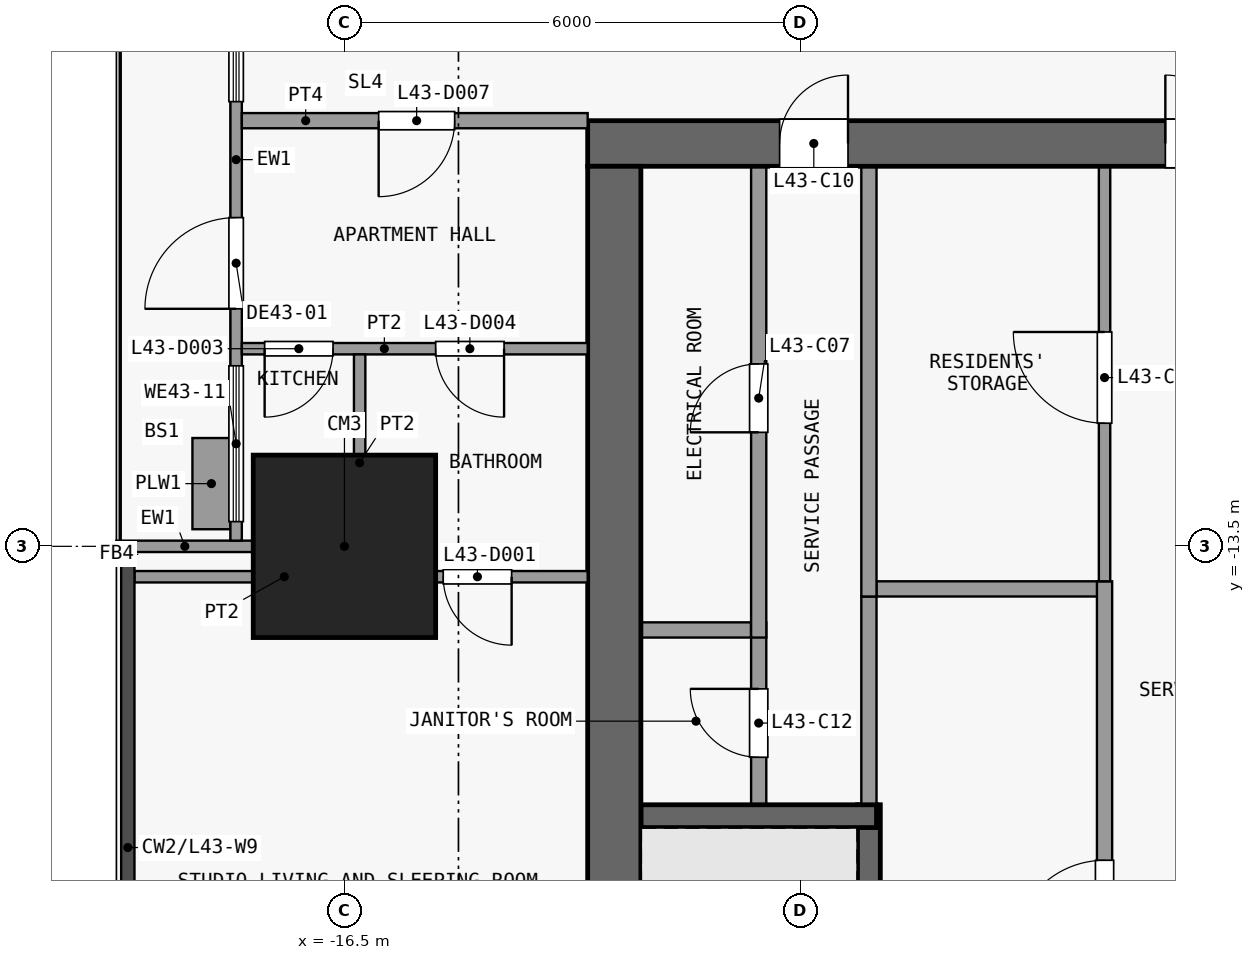
"""IFC4 building model, lengths in metres.
Left out: names, types, materials, properties, quantities, classifications, styles, units other than length and angle.
Written with IfcOpenShell. Run it as: python <this file> out.ifc"""

import sys

from ifc_helpers import new_model, si_unit, direction, frame, frame_2d, origin, origin_2d, place, context, subcontext, project, spatial, rectangle, extrude, element, fill, save


model = new_model("IFC4")
c1 = context("Model", 3, precision=1e-05, world=origin(), true_north=direction((0.0, 1.0)))
c2 = subcontext(c1, "Body", "Model", "MODEL_VIEW")
j1 = project(units=[si_unit("LENGTHUNIT", "METRE"), si_unit("PLANEANGLEUNIT", "RADIAN")], contexts=[c1])
p1 = place(None, origin())
s1 = spatial("IfcSite", under=j1, at=p1, CompositionType="ELEMENT")
p2 = place(p1, origin())
s2 = spatial("IfcBuilding", under=s1, at=p2, CompositionType="ELEMENT")
p3 = place(p2, frame((0.0, 0.0, 174.5)))
s3 = spatial("IfcBuildingStorey", under=s2, at=p3, CompositionType="ELEMENT", Elevation=174.5)
p4 = place(p3, frame((-16.5, -13.5, 0.0), z_axis=(0.0, 0.0, 1.0), x_axis=(1.0, 0.0, 0.0)))
e1 = element("IfcColumn", 1, at=p4, inside=s3, PredefinedType="COLUMN", context=c2, shape_type="SweptSolid", body=[
    extrude(rectangle(XDim=2.4, YDim=2.4, at=origin_2d()), origin(), (0.0, 0.0, 1.0), 3.6),
])
p5 = place(p3, frame((-13.3, -8.2, 0.0), z_axis=(0.0, 0.0, 1.0), x_axis=(1.0, 0.0, 0.0)))
e2 = element("IfcWall", 2, at=p5, inside=s3, PredefinedType="SHEAR", context=c2, shape_type="SweptSolid", body=[
    extrude(rectangle(XDim=26.6, YDim=0.6, at=frame_2d((13.3, 0.0))), origin(), (0.0, 0.0, 1.0), 3.3),
])
p6 = place(p5, frame((7.6, 0.0, 0.0)))
e3 = element("IfcOpeningElement", 3, at=p6, cuts=e2, PredefinedType="OPENING", context=c2, shape_type="SweptSolid", body=[
    extrude(rectangle(XDim=1.8, YDim=2.1, at=frame_2d((0.9, 1.05))), frame((0.0, 0.31, 0.0), z_axis=(0.0, -1.0, 0.0), x_axis=(1.0, 0.0, 0.0)), (0.0, 0.0, 1.0), 0.62),
])
p7 = place(p5, frame((17.2, 0.0, 0.0)))
e4 = element("IfcOpeningElement", 4, at=p7, cuts=e2, PredefinedType="OPENING", context=c2, shape_type="SweptSolid", body=[
    extrude(rectangle(XDim=1.8, YDim=2.1, at=frame_2d((0.9, 1.05))), frame((0.0, 0.31, 0.0), z_axis=(0.0, -1.0, 0.0), x_axis=(1.0, 0.0, 0.0)), (0.0, 0.0, 1.0), 0.62),
])
p8 = place(p5, frame((2.525, 0.0, 0.0)))
e5 = element("IfcOpeningElement", 5, at=p8, cuts=e2, PredefinedType="OPENING", context=c2, shape_type="SweptSolid", body=[
    extrude(rectangle(XDim=0.9, YDim=2.1, at=frame_2d((0.45, 1.05))), frame((0.0, 0.31, 0.0), z_axis=(0.0, -1.0, 0.0), x_axis=(1.0, 0.0, 0.0)), (0.0, 0.0, 1.0), 0.62),
])
p9 = place(p5, frame((23.175, 0.0, 0.0)))
e6 = element("IfcOpeningElement", 6, at=p9, cuts=e2, PredefinedType="OPENING", context=c2, shape_type="SweptSolid", body=[
    extrude(rectangle(XDim=0.9, YDim=2.1, at=frame_2d((0.45, 1.05))), frame((0.0, 0.31, 0.0), z_axis=(0.0, -1.0, 0.0), x_axis=(1.0, 0.0, 0.0)), (0.0, 0.0, 1.0), 0.62),
])
p10 = place(p3, frame((-12.95, -24.6, 0.0), z_axis=(0.0, 0.0, 1.0), x_axis=(0.0, 1.0, 0.0)))
e7 = element("IfcWall", 7, at=p10, inside=s3, PredefinedType="SHEAR", context=c2, shape_type="SweptSolid", body=[
    extrude(rectangle(XDim=16.1, YDim=0.7, at=frame_2d((8.05, 0.0))), origin(), (0.0, 0.0, 1.0), 3.3),
])
p11 = place(p3, frame((-12.6, -17.05, 0.0), z_axis=(0.0, 0.0, 1.0), x_axis=(1.0, 0.0, 0.0)))
e8 = element("IfcWall", 8, at=p11, inside=s3, PredefinedType="SHEAR", context=c2, shape_type="SweptSolid", body=[
    extrude(rectangle(XDim=3.1, YDim=0.3, at=frame_2d((1.55, 0.0))), origin(), (0.0, 0.0, 1.0), 3.3),
])
p12 = place(p3, frame((-12.6, -14.6, 0.0), z_axis=(0.0, 0.0, 1.0), x_axis=(1.0, 0.0, 0.0)))
e9 = element("IfcWall", 9, at=p12, inside=s3, PredefinedType="PARTITIONING", context=c2, shape_type="SweptSolid", body=[
    extrude(rectangle(XDim=1.45, YDim=0.2, at=frame_2d((0.725, 0.0))), origin(), (0.0, 0.0, 1.0), 3.3),
])
p13 = place(p3, frame((-9.5, -14.06, 0.0), z_axis=(0.0, 0.0, 1.0), x_axis=(1.0, 0.0, 0.0)))
e10 = element("IfcWall", 10, at=p13, inside=s3, PredefinedType="PARTITIONING", context=c2, shape_type="SweptSolid", body=[
    extrude(rectangle(XDim=3.075, YDim=0.2, at=frame_2d((1.538, 0.0))), origin(), (0.0, 0.0, 1.0), 3.3),
])
p14 = place(p3, frame((-11.05, -16.9, 0.0), z_axis=(0.0, 0.0, 1.0), x_axis=(0.0, 1.0, 0.0)))
e11 = element("IfcWall", 11, at=p14, inside=s3, PredefinedType="PARTITIONING", context=c2, shape_type="SweptSolid", body=[
    extrude(rectangle(XDim=2.4, YDim=0.2, at=frame_2d((1.2, 0.0))), origin(), (0.0, 0.0, 1.0), 3.3),
])
p15 = place(p14, frame((0.625, 0.0, 0.0)))
e12 = element("IfcOpeningElement", 12, at=p15, cuts=e11, PredefinedType="OPENING", context=c2, shape_type="SweptSolid", body=[
    extrude(rectangle(XDim=0.9, YDim=2.1, at=frame_2d((0.45, 1.05))), frame((0.0, 0.11, 0.0), z_axis=(0.0, -1.0, 0.0), x_axis=(1.0, 0.0, 0.0)), (0.0, 0.0, 1.0), 0.22),
])
p16 = place(p3, frame((-11.05, -14.7, 0.0), z_axis=(0.0, 0.0, 1.0), x_axis=(0.0, 1.0, 0.0)))
e13 = element("IfcWall", 13, at=p16, inside=s3, PredefinedType="PARTITIONING", context=c2, shape_type="SweptSolid", body=[
    extrude(rectangle(XDim=6.2, YDim=0.2, at=frame_2d((3.1, 0.0))), origin(), (0.0, 0.0, 1.0), 3.3),
])
p17 = place(p16, frame((2.7, 0.0, 0.0)))
e14 = element("IfcOpeningElement", 14, at=p17, cuts=e13, PredefinedType="OPENING", context=c2, shape_type="SweptSolid", body=[
    extrude(rectangle(XDim=0.9, YDim=2.1, at=frame_2d((0.45, 1.05))), frame((0.0, 0.11, 0.0), z_axis=(0.0, -1.0, 0.0), x_axis=(1.0, 0.0, 0.0)), (0.0, 0.0, 1.0), 0.22),
])
p18 = place(p3, frame((-9.6, -24.6, 0.0), z_axis=(0.0, 0.0, 1.0), x_axis=(0.0, 1.0, 0.0)))
e15 = element("IfcWall", 15, at=p18, inside=s3, PredefinedType="SHEAR", context=c2, shape_type="SweptSolid", body=[
    extrude(rectangle(XDim=7.7, YDim=0.3, at=frame_2d((3.85, 0.0))), origin(), (0.0, 0.0, 1.0), 3.3),
])
p19 = place(p18, frame((0.1, 0.0, 0.0)))
e16 = element("IfcOpeningElement", 16, at=p19, cuts=e15, PredefinedType="OPENING", context=c2, shape_type="SweptSolid", body=[
    extrude(rectangle(XDim=1.1, YDim=2.1, at=frame_2d((0.55, 1.05))), frame((0.0, 0.16, 0.0), z_axis=(0.0, -1.0, 0.0), x_axis=(1.0, 0.0, 0.0)), (0.0, 0.0, 1.0), 0.32),
])
p20 = place(p3, frame((-9.6, -16.9, 0.0), z_axis=(0.0, 0.0, 1.0), x_axis=(0.0, 1.0, 0.0)))
e17 = element("IfcWall", 17, at=p20, inside=s3, PredefinedType="PARTITIONING", context=c2, shape_type="SweptSolid", body=[
    extrude(rectangle(XDim=2.74, YDim=0.2, at=frame_2d((1.37, 0.0))), origin(), (0.0, 0.0, 1.0), 3.3),
])
p21 = place(p3, frame((-9.6, -14.16, 0.0), z_axis=(0.0, 0.0, 1.0), x_axis=(0.0, 1.0, 0.0)))
e18 = element("IfcWall", 18, at=p21, inside=s3, PredefinedType="PARTITIONING", context=c2, shape_type="SweptSolid", body=[
    extrude(rectangle(XDim=5.66, YDim=0.2, at=frame_2d((2.83, 0.0))), origin(), (0.0, 0.0, 1.0), 3.3),
])
p22 = place(p3, frame((-6.5, -22.5, 0.0), z_axis=(0.0, 0.0, 1.0), x_axis=(0.0, 1.0, 0.0)))
e19 = element("IfcWall", 19, at=p22, inside=s3, PredefinedType="PARTITIONING", context=c2, shape_type="SweptSolid", body=[
    extrude(rectangle(XDim=8.54, YDim=0.2, at=frame_2d((4.27, 0.0))), origin(), (0.0, 0.0, 1.0), 3.3),
])
p23 = place(p22, frame((3.67, 0.0, 0.0)))
e20 = element("IfcOpeningElement", 20, at=p23, cuts=e19, PredefinedType="OPENING", context=c2, shape_type="SweptSolid", body=[
    extrude(rectangle(XDim=1.2, YDim=2.1, at=frame_2d((0.6, 1.05))), frame((0.0, 0.11, 0.0), z_axis=(0.0, -1.0, 0.0), x_axis=(1.0, 0.0, 0.0)), (0.0, 0.0, 1.0), 0.22),
])
p24 = place(p3, frame((-6.5, -13.96, 0.0), z_axis=(0.0, 0.0, 1.0), x_axis=(0.0, 1.0, 0.0)))
e21 = element("IfcWall", 21, at=p24, inside=s3, PredefinedType="PARTITIONING", context=c2, shape_type="SweptSolid", body=[
    extrude(rectangle(XDim=5.46, YDim=0.15, at=frame_2d((2.73, 0.0))), origin(), (0.0, 0.0, 1.0), 3.3),
])
p25 = place(p24, frame((2.08, 0.0, 0.0)))
e22 = element("IfcOpeningElement", 22, at=p25, cuts=e21, PredefinedType="OPENING", context=c2, shape_type="SweptSolid", body=[
    extrude(rectangle(XDim=1.2, YDim=2.1, at=frame_2d((0.6, 1.05))), frame((0.0, 0.085, 0.0), z_axis=(0.0, -1.0, 0.0), x_axis=(1.0, 0.0, 0.0)), (0.0, 0.0, 1.0), 0.17),
])
p26 = place(p3, frame((-17.7, -13.5, 0.0), z_axis=(0.0, 0.0, 1.0), x_axis=(-1.0, 0.0, 0.0)))
e23 = element("IfcWall", 23, at=p26, inside=s3, PredefinedType="SOLIDWALL", context=c2, shape_type="SweptSolid", body=[
    extrude(rectangle(XDim=1.8, YDim=0.15, at=frame_2d((0.9, 0.0))), origin(), (0.0, 0.0, 1.0), 3.3),
])
p27 = place(p3, frame((-17.925, -13.425, 0.0), z_axis=(0.0, 0.0, 1.0), x_axis=(0.0, 1.0, 0.0)))
e24 = element("IfcWall", 24, at=p27, inside=s3, PredefinedType="SOLIDWALL", context=c2, shape_type="SweptSolid", body=[
    extrude(rectangle(XDim=8.925, YDim=0.15, at=frame_2d((4.462, 0.0))), origin(), (0.0, 0.0, 1.0), 3.3),
])
p28 = place(p27, frame((3.05, 0.0, 0.0)))
e25 = element("IfcOpeningElement", 25, at=p28, cuts=e24, PredefinedType="OPENING", context=c2, shape_type="SweptSolid", body=[
    extrude(rectangle(XDim=1.2, YDim=2.4, at=frame_2d((0.6, 1.2))), frame((0.0, 0.085, 0.0), z_axis=(0.0, -1.0, 0.0), x_axis=(1.0, 0.0, 0.0)), (0.0, 0.0, 1.0), 0.17),
])
p29 = place(p27, frame((0.25, 0.0, 0.9)))
e26 = element("IfcOpeningElement", 26, at=p29, cuts=e24, PredefinedType="OPENING", context=c2, shape_type="SweptSolid", body=[
    extrude(rectangle(XDim=2.05, YDim=2.1, at=frame_2d((1.025, 1.05))), frame((0.0, 0.085, 0.0), z_axis=(0.0, -1.0, 0.0), x_axis=(1.0, 0.0, 0.0)), (0.0, 0.0, 1.0), 0.17),
])
p30 = place(p27, frame((5.775, 0.0, 0.9)))
e27 = element("IfcOpeningElement", 27, at=p30, cuts=e24, PredefinedType="OPENING", context=c2, shape_type="SweptSolid", body=[
    extrude(rectangle(XDim=2.312, YDim=2.1, at=frame_2d((1.156, 1.05))), frame((0.0, 0.085, 0.0), z_axis=(0.0, -1.0, 0.0), x_axis=(1.0, 0.0, 0.0)), (0.0, 0.0, 1.0), 0.17),
])
p31 = place(p3, frame((-18.25, -13.275, 0.0), z_axis=(0.0, 0.0, 1.0), x_axis=(0.0, 1.0, 0.0)))
e28 = element("IfcWall", 28, at=p31, inside=s3, PredefinedType="USERDEFINED", context=c2, shape_type="SweptSolid", body=[
    extrude(rectangle(XDim=1.2, YDim=0.5, at=frame_2d((0.6, 0.0))), origin(), (0.0, 0.0, 1.0), 0.9),
])
p32 = place(p3, frame((-19.262, -13.9, 0.0), z_axis=(0.0, 0.0, 1.0), x_axis=(1.0, 0.0, 0.0)))
e29 = element("IfcWall", 29, at=p32, inside=s3, PredefinedType="PARTITIONING", context=c2, shape_type="SweptSolid", body=[
    extrude(rectangle(XDim=5.962, YDim=0.15, at=frame_2d((2.981, 0.0))), origin(), (0.0, 0.0, 1.0), 3.3),
])
p33 = place(p32, frame((4.062, 0.0, 0.0)))
e30 = element("IfcOpeningElement", 30, at=p33, cuts=e29, PredefinedType="OPENING", context=c2, shape_type="SweptSolid", body=[
    extrude(rectangle(XDim=0.9, YDim=2.1, at=frame_2d((0.45, 1.05))), frame((0.0, 0.085, 0.0), z_axis=(0.0, -1.0, 0.0), x_axis=(1.0, 0.0, 0.0)), (0.0, 0.0, 1.0), 0.17),
])
p34 = place(p3, frame((-17.85, -10.9, 0.0), z_axis=(0.0, 0.0, 1.0), x_axis=(1.0, 0.0, 0.0)))
e31 = element("IfcWall", 31, at=p34, inside=s3, PredefinedType="PARTITIONING", context=c2, shape_type="SweptSolid", body=[
    extrude(rectangle(XDim=4.55, YDim=0.15, at=frame_2d((2.275, 0.0))), origin(), (0.0, 0.0, 1.0), 3.3),
])
p35 = place(p34, frame((0.3, 0.0, 0.0)))
e32 = element("IfcOpeningElement", 32, at=p35, cuts=e31, PredefinedType="OPENING", context=c2, shape_type="SweptSolid", body=[
    extrude(rectangle(XDim=0.9, YDim=2.1, at=frame_2d((0.45, 1.05))), frame((0.0, 0.085, 0.0), z_axis=(0.0, -1.0, 0.0), x_axis=(1.0, 0.0, 0.0)), (0.0, 0.0, 1.0), 0.17),
])
p36 = place(p34, frame((2.55, 0.0, 0.0)))
e33 = element("IfcOpeningElement", 33, at=p36, cuts=e31, PredefinedType="OPENING", context=c2, shape_type="SweptSolid", body=[
    extrude(rectangle(XDim=0.9, YDim=2.1, at=frame_2d((0.45, 1.05))), frame((0.0, 0.085, 0.0), z_axis=(0.0, -1.0, 0.0), x_axis=(1.0, 0.0, 0.0)), (0.0, 0.0, 1.0), 0.17),
])
p37 = place(p3, frame((-17.85, -7.9, 0.0), z_axis=(0.0, 0.0, 1.0), x_axis=(1.0, 0.0, 0.0)))
e34 = element("IfcWall", 34, at=p37, inside=s3, PredefinedType="PARTITIONING", context=c2, shape_type="SweptSolid", body=[
    extrude(rectangle(XDim=4.55, YDim=0.2, at=frame_2d((2.275, 0.0))), origin(), (0.0, 0.0, 1.0), 3.3),
])
p38 = place(p37, frame((1.8, 0.0, 0.0)))
e35 = element("IfcOpeningElement", 35, at=p38, cuts=e34, PredefinedType="OPENING", context=c2, shape_type="SweptSolid", body=[
    extrude(rectangle(XDim=1.0, YDim=2.1, at=frame_2d((0.5, 1.05))), frame((0.0, 0.11, 0.0), z_axis=(0.0, -1.0, 0.0), x_axis=(1.0, 0.0, 0.0)), (0.0, 0.0, 1.0), 0.22),
])
p39 = place(p3, frame((-16.3, -13.825, 0.0), z_axis=(0.0, 0.0, 1.0), x_axis=(0.0, 1.0, 0.0)))
e36 = element("IfcWall", 36, at=p39, inside=s3, PredefinedType="PARTITIONING", context=c2, shape_type="SweptSolid", body=[
    extrude(rectangle(XDim=2.85, YDim=0.15, at=frame_2d((1.425, 0.0))), origin(), (0.0, 0.0, 1.0), 3.3),
])
p40 = place(p6, origin())
e37 = element("IfcDoor", 37, at=p40, inside=s3, OperationType="DOUBLE_DOOR_SINGLE_SWING", PredefinedType="DOOR", context=c2, shape_type="SweptSolid", body=[
    extrude(rectangle(XDim=1.8, YDim=2.1, at=frame_2d((0.9, 1.05))), frame((0.0, 0.025, 0.0), z_axis=(0.0, -1.0, 0.0), x_axis=(1.0, 0.0, 0.0)), (0.0, 0.0, 1.0), 0.05),
])
fill(e3, e37)
p41 = place(p17, origin())
e38 = element("IfcDoor", 38, at=p41, inside=s3, OperationType="SINGLE_SWING_LEFT", PredefinedType="DOOR", context=c2, shape_type="SweptSolid", body=[
    extrude(rectangle(XDim=0.9, YDim=2.1, at=frame_2d((0.45, 1.05))), frame((0.0, 0.025, 0.0), z_axis=(0.0, -1.0, 0.0), x_axis=(1.0, 0.0, 0.0)), (0.0, 0.0, 1.0), 0.05),
])
fill(e14, e38)
p42 = place(p23, origin())
e39 = element("IfcDoor", 39, at=p42, inside=s3, OperationType="SINGLE_SWING_LEFT", PredefinedType="DOOR", context=c2, shape_type="SweptSolid", body=[
    extrude(rectangle(XDim=1.2, YDim=2.1, at=frame_2d((0.6, 1.05))), frame((0.0, 0.025, 0.0), z_axis=(0.0, -1.0, 0.0), x_axis=(1.0, 0.0, 0.0)), (0.0, 0.0, 1.0), 0.05),
])
fill(e20, e39)
p43 = place(p8, origin())
e40 = element("IfcDoor", 40, at=p43, inside=s3, OperationType="SINGLE_SWING_RIGHT", PredefinedType="DOOR", context=c2, shape_type="SweptSolid", body=[
    extrude(rectangle(XDim=0.9, YDim=2.1, at=frame_2d((0.45, 1.05))), frame((0.0, 0.025, 0.0), z_axis=(0.0, -1.0, 0.0), x_axis=(1.0, 0.0, 0.0)), (0.0, 0.0, 1.0), 0.05),
])
fill(e5, e40)
p44 = place(p15, origin())
e41 = element("IfcDoor", 41, at=p44, inside=s3, OperationType="SINGLE_SWING_RIGHT", PredefinedType="DOOR", context=c2, shape_type="SweptSolid", body=[
    extrude(rectangle(XDim=0.9, YDim=2.1, at=frame_2d((0.45, 1.05))), frame((0.0, 0.025, 0.0), z_axis=(0.0, -1.0, 0.0), x_axis=(1.0, 0.0, 0.0)), (0.0, 0.0, 1.0), 0.05),
])
fill(e12, e41)
p45 = place(p25, origin())
e42 = element("IfcDoor", 42, at=p45, inside=s3, OperationType="SINGLE_SWING_RIGHT", PredefinedType="DOOR", context=c2, shape_type="SweptSolid", body=[
    extrude(rectangle(XDim=1.2, YDim=2.1, at=frame_2d((0.6, 1.05))), frame((0.0, 0.025, 0.0), z_axis=(0.0, -1.0, 0.0), x_axis=(1.0, 0.0, 0.0)), (0.0, 0.0, 1.0), 0.05),
])
fill(e22, e42)
p46 = place(p28, origin())
e43 = element("IfcDoor", 43, at=p46, inside=s3, OperationType="SINGLE_SWING_LEFT", PredefinedType="DOOR", context=c2, shape_type="SweptSolid", body=[
    extrude(rectangle(XDim=1.2, YDim=2.4, at=frame_2d((0.6, 1.2))), frame((0.0, 0.025, 0.0), z_axis=(0.0, -1.0, 0.0), x_axis=(1.0, 0.0, 0.0)), (0.0, 0.0, 1.0), 0.05),
])
fill(e25, e43)
p47 = place(p29, origin())
e44 = element("IfcWindow", 44, at=p47, inside=s3, PartitioningType="SINGLE_PANEL", PredefinedType="WINDOW", context=c2, shape_type="SweptSolid", body=[
    extrude(rectangle(XDim=2.05, YDim=2.1, at=frame_2d((1.025, 1.05))), frame((0.0, 0.03, 0.0), z_axis=(0.0, -1.0, 0.0), x_axis=(1.0, 0.0, 0.0)), (0.0, 0.0, 1.0), 0.06),
])
fill(e26, e44)
p48 = place(p30, origin())
e45 = element("IfcWindow", 45, at=p48, inside=s3, PartitioningType="SINGLE_PANEL", PredefinedType="WINDOW", context=c2, shape_type="SweptSolid", body=[
    extrude(rectangle(XDim=2.312, YDim=2.1, at=frame_2d((1.156, 1.05))), frame((0.0, 0.03, 0.0), z_axis=(0.0, -1.0, 0.0), x_axis=(1.0, 0.0, 0.0)), (0.0, 0.0, 1.0), 0.06),
])
fill(e27, e45)
p49 = place(p33, origin())
e46 = element("IfcDoor", 46, at=p49, inside=s3, OperationType="SINGLE_SWING_RIGHT", PredefinedType="DOOR", context=c2, shape_type="SweptSolid", body=[
    extrude(rectangle(XDim=0.9, YDim=2.1, at=frame_2d((0.45, 1.05))), frame((0.0, 0.025, 0.0), z_axis=(0.0, -1.0, 0.0), x_axis=(1.0, 0.0, 0.0)), (0.0, 0.0, 1.0), 0.05),
])
fill(e30, e46)
p50 = place(p35, origin())
e47 = element("IfcDoor", 47, at=p50, inside=s3, OperationType="SINGLE_SWING_LEFT", PredefinedType="DOOR", context=c2, shape_type="SweptSolid", body=[
    extrude(rectangle(XDim=0.9, YDim=2.1, at=frame_2d((0.45, 1.05))), frame((0.0, 0.025, 0.0), z_axis=(0.0, -1.0, 0.0), x_axis=(1.0, 0.0, 0.0)), (0.0, 0.0, 1.0), 0.05),
])
fill(e32, e47)
p51 = place(p36, origin())
e48 = element("IfcDoor", 48, at=p51, inside=s3, OperationType="SINGLE_SWING_RIGHT", PredefinedType="DOOR", context=c2, shape_type="SweptSolid", body=[
    extrude(rectangle(XDim=0.9, YDim=2.1, at=frame_2d((0.45, 1.05))), frame((0.0, 0.025, 0.0), z_axis=(0.0, -1.0, 0.0), x_axis=(1.0, 0.0, 0.0)), (0.0, 0.0, 1.0), 0.05),
])
fill(e33, e48)
p52 = place(p38, origin())
e49 = element("IfcDoor", 49, at=p52, inside=s3, OperationType="SINGLE_SWING_LEFT", PredefinedType="DOOR", context=c2, shape_type="SweptSolid", body=[
    extrude(rectangle(XDim=1.0, YDim=2.1, at=frame_2d((0.5, 1.05))), frame((0.0, 0.025, 0.0), z_axis=(0.0, -1.0, 0.0), x_axis=(1.0, 0.0, 0.0)), (0.0, 0.0, 1.0), 0.05),
])
fill(e35, e49)
save(model, sys.argv[1])
